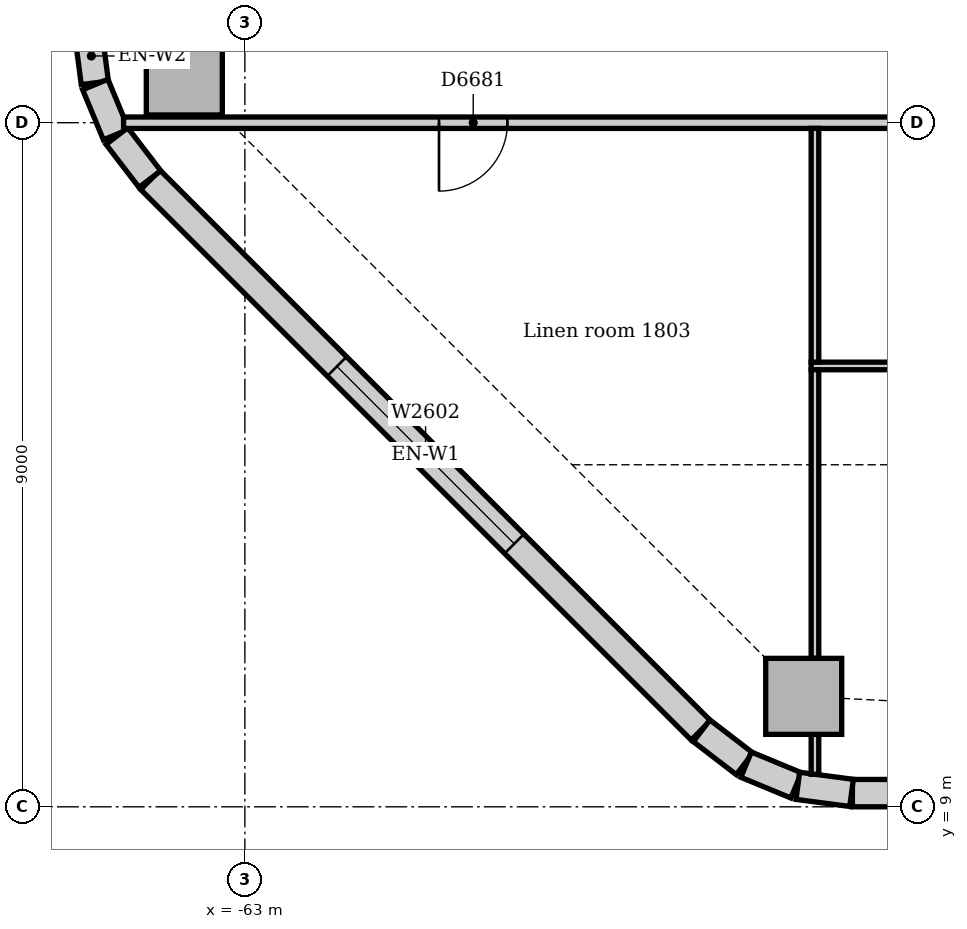
"""IFC4 building model, lengths in metres.
Left out: names, types, materials, properties, quantities, classifications, styles, units other than length and angle.
Written with IfcOpenShell. Run it as: python <this file> out.ifc"""

import sys

from ifc_helpers import new_model, si_unit, direction, frame, frame_2d, origin, origin_2d, place, context, subcontext, project, spatial, rectangle, extrude, element, fill, save


model = new_model("IFC4")
c1 = context("Model", 3, precision=1e-05, world=origin(), true_north=direction((0.0, 1.0)))
c2 = subcontext(c1, "Body", "Model", "MODEL_VIEW")
j1 = project(units=[si_unit("LENGTHUNIT", "METRE"), si_unit("PLANEANGLEUNIT", "RADIAN")], contexts=[c1])
p1 = place(None, origin())
s1 = spatial("IfcSite", under=j1, at=p1, CompositionType="ELEMENT")
p2 = place(p1, origin())
s2 = spatial("IfcBuilding", under=s1, at=p2, CompositionType="ELEMENT")
p3 = place(p2, frame((0.0, 0.0, 79.0)))
s3 = spatial("IfcBuildingStorey", under=s2, at=p3, CompositionType="ELEMENT", Elevation=79.0)
for number, where, z_axis, x_axis in (
    (1, (-55.648, 10.453, 0.0), (0.0, 0.0, 1.0), (1.0, 0.0, 0.0)),
    (2, (-63.797, 18.602, 0.0), (0.0, 0.0, 1.0), (1.0, 0.0, 0.0)),
):
    element("IfcColumn", number, at=place(p3, frame(where, z_axis=z_axis, x_axis=x_axis)), inside=s3, PredefinedType="COLUMN", context=c2, shape_type="SweptSolid", body=[
        extrude(rectangle(XDim=1.0, YDim=1.0, at=origin_2d()), origin(), (0.0, 0.0, 1.0), 3.85),
    ])
p4 = place(p3, frame((-55.007, 9.18, 0.0), z_axis=(0.0, 0.0, 1.0), x_axis=(1.0, 0.0, 0.0)))
e3 = element("IfcWall", 3, at=p4, inside=s3, PredefinedType="STANDARD", context=c2, shape_type="SweptSolid", body=[
    extrude(rectangle(XDim=23.765, YDim=0.36, at=frame_2d((11.882, 0.0))), origin(), (0.0, 0.0, 1.0), 3.85),
])
p5 = place(p4, frame((3.482, 0.0, 0.9)))
e4 = element("IfcOpeningElement", 4, at=p5, cuts=e3, PredefinedType="OPENING", context=c2, shape_type="SweptSolid", body=[
    extrude(rectangle(XDim=3.3, YDim=1.6, at=frame_2d((1.65, 0.8))), frame((0.0, 0.19, 0.0), z_axis=(0.0, -1.0, 0.0), x_axis=(1.0, 0.0, 0.0)), (0.0, 0.0, 1.0), 0.38),
])
p6 = place(p4, frame((7.982, 0.0, 0.9)))
e5 = element("IfcOpeningElement", 5, at=p6, cuts=e3, PredefinedType="OPENING", context=c2, shape_type="SweptSolid", body=[
    extrude(rectangle(XDim=3.3, YDim=1.6, at=frame_2d((1.65, 0.8))), frame((0.0, 0.19, 0.0), z_axis=(0.0, -1.0, 0.0), x_axis=(1.0, 0.0, 0.0)), (0.0, 0.0, 1.0), 0.38),
])
p7 = place(p4, frame((12.482, 0.0, 0.9)))
e6 = element("IfcOpeningElement", 6, at=p7, cuts=e3, PredefinedType="OPENING", context=c2, shape_type="SweptSolid", body=[
    extrude(rectangle(XDim=3.3, YDim=1.6, at=frame_2d((1.65, 0.8))), frame((0.0, 0.19, 0.0), z_axis=(0.0, -1.0, 0.0), x_axis=(1.0, 0.0, 0.0)), (0.0, 0.0, 1.0), 0.38),
])
p8 = place(p4, frame((17.732, 0.0, 0.9)))
e7 = element("IfcOpeningElement", 7, at=p8, cuts=e3, PredefinedType="OPENING", context=c2, shape_type="SweptSolid", body=[
    extrude(rectangle(XDim=3.3, YDim=1.6, at=frame_2d((1.65, 0.8))), frame((0.0, 0.19, 0.0), z_axis=(0.0, -1.0, 0.0), x_axis=(1.0, 0.0, 0.0)), (0.0, 0.0, 1.0), 0.38),
])
p9 = place(p3, frame((-64.244, 17.249, 0.0), z_axis=(0.0, 0.0, 1.0), x_axis=(0.707106781187, -0.707106781187, 0.0)))
e8 = element("IfcWall", 8, at=p9, inside=s3, PredefinedType="STANDARD", context=c2, shape_type="SweptSolid", body=[
    extrude(rectangle(XDim=10.243, YDim=0.36, at=frame_2d((5.121, 0.0))), origin(), (0.0, 0.0, 1.0), 3.85),
])
p10 = place(p9, frame((3.471, 0.0, 0.9)))
e9 = element("IfcOpeningElement", 9, at=p10, cuts=e8, PredefinedType="OPENING", context=c2, shape_type="SweptSolid", body=[
    extrude(rectangle(XDim=3.3, YDim=1.6, at=frame_2d((1.65, 0.8))), frame((0.0, 0.19, 0.0), z_axis=(0.0, -1.0, 0.0), x_axis=(1.0, 0.0, 0.0)), (0.0, 0.0, 1.0), 0.38),
])
for number, where, z_axis, x_axis in (
    (10, (-65.067, 19.231, 0.0), (0.0, 0.0, 1.0), (0.131, -0.991, 0.0)),
    (11, (-64.968, 18.503, 0.0), (0.0, 0.0, 1.0), (0.383, -0.924, 0.0)),
):
    element("IfcWall", number, at=place(p3, frame(where, z_axis=z_axis, x_axis=x_axis)), inside=s3, PredefinedType="STANDARD", context=c2, shape_type="SweptSolid", body=[
        extrude(rectangle(XDim=0.713, YDim=0.36, at=frame_2d((0.356, 0.0))), origin(), (0.0, 0.0, 1.0), 3.85),
    ])
for number, where, z_axis, x_axis in (
    (12, (-64.684, 17.825, 0.0), (0.0, 0.0, 1.0), (0.609, -0.793, 0.0)),
    (13, (-56.991, 10.0, 0.0), (0.0, 0.0, 1.0), (0.793, -0.609, 0.0)),
):
    element("IfcWall", number, at=place(p3, frame(where, z_axis=z_axis, x_axis=x_axis)), inside=s3, PredefinedType="STANDARD", context=c2, shape_type="SweptSolid", body=[
        extrude(rectangle(XDim=0.713, YDim=0.36, at=frame_2d((0.357, 0.0))), origin(), (0.0, 0.0, 1.0), 3.85),
    ])
for number, where, z_axis, x_axis in (
    (14, (-56.406, 9.555, 0.0), (0.0, 0.0, 1.0), (0.924, -0.383, 0.0)),
    (15, (-55.726, 9.276, 0.0), (0.0, 0.0, 1.0), (0.991, -0.131, 0.0)),
):
    element("IfcWall", number, at=place(p3, frame(where, z_axis=z_axis, x_axis=x_axis)), inside=s3, PredefinedType="STANDARD", context=c2, shape_type="SweptSolid", body=[
        extrude(rectangle(XDim=0.713, YDim=0.36, at=frame_2d((0.356, 0.0))), origin(), (0.0, 0.0, 1.0), 3.85),
    ])
p11 = place(p3, frame((-64.596, 18.0, 0.0), z_axis=(0.0, 0.0, 1.0), x_axis=(1.0, 0.0, 0.0)))
e16 = element("IfcWall", 16, at=p11, inside=s3, PredefinedType="PARTITIONING", context=c2, shape_type="SweptSolid", body=[
    extrude(rectangle(XDim=10.246, YDim=0.15, at=frame_2d((5.123, 0.0))), origin(), (0.0, 0.0, 1.0), 3.158),
])
p12 = place(p11, frame((4.15, 0.0, 0.0)))
e17 = element("IfcOpeningElement", 17, at=p12, cuts=e16, PredefinedType="OPENING", context=c2, shape_type="SweptSolid", body=[
    extrude(rectangle(XDim=0.9, YDim=2.1, at=frame_2d((0.45, 1.05))), frame((0.0, 0.085, 0.0), z_axis=(0.0, -1.0, 0.0), x_axis=(1.0, 0.0, 0.0)), (0.0, 0.0, 1.0), 0.17),
])
p13 = place(p3, frame((-55.55, 14.8, 0.0), z_axis=(0.0, 0.0, 1.0), x_axis=(1.0, 0.0, 0.0)))
e18 = element("IfcWall", 18, at=p13, inside=s3, PredefinedType="PARTITIONING", context=c2, shape_type="SweptSolid", body=[
    extrude(rectangle(XDim=17.975, YDim=0.1, at=frame_2d((8.988, 0.0))), origin(), (0.0, 0.0, 1.0), 3.85),
])
p14 = place(p13, frame((7.18, 0.0, 0.0)))
e19 = element("IfcOpeningElement", 19, at=p14, cuts=e18, PredefinedType="OPENING", context=c2, shape_type="SweptSolid", body=[
    extrude(rectangle(XDim=0.9, YDim=2.1, at=frame_2d((0.45, 1.05))), frame((0.0, 0.06, 0.0), z_axis=(0.0, -1.0, 0.0), x_axis=(1.0, 0.0, 0.0)), (0.0, 0.0, 1.0), 0.12),
])
p15 = place(p3, frame((-55.5, 14.85, 0.0), z_axis=(0.0, 0.0, 1.0), x_axis=(0.0, 1.0, 0.0)))
e20 = element("IfcWall", 20, at=p15, inside=s3, PredefinedType="PARTITIONING", context=c2, shape_type="SweptSolid", body=[
    extrude(rectangle(XDim=3.075, YDim=0.1, at=frame_2d((1.538, 0.0))), origin(), (0.0, 0.0, 1.0), 3.85),
])
p16 = place(p3, frame((-55.5, 10.953, 0.0), z_axis=(0.0, 0.0, 1.0), x_axis=(0.0, 1.0, 0.0)))
e21 = element("IfcWall", 21, at=p16, inside=s3, PredefinedType="PARTITIONING", context=c2, shape_type="SweptSolid", body=[
    extrude(rectangle(XDim=3.797, YDim=0.1, at=frame_2d((1.898, 0.0))), origin(), (0.0, 0.0, 1.0), 3.85),
])
p17 = place(p3, frame((-55.5, 9.428, 0.0), z_axis=(0.0, 0.0, 1.0), x_axis=(0.0, 1.0, 0.0)))
e22 = element("IfcWall", 22, at=p17, inside=s3, PredefinedType="PARTITIONING", context=c2, shape_type="SweptSolid", body=[
    extrude(rectangle(XDim=0.525, YDim=0.1, at=frame_2d((0.263, 0.0))), origin(), (0.0, 0.0, 1.0), 3.85),
])
p18 = place(p10, origin())
e23 = element("IfcWindow", 23, at=p18, inside=s3, PartitioningType="SINGLE_PANEL", PredefinedType="WINDOW", context=c2, shape_type="SweptSolid", body=[
    extrude(rectangle(XDim=3.3, YDim=1.6, at=frame_2d((1.65, 0.8))), frame((0.0, 0.13, 0.0), z_axis=(0.0, -1.0, 0.0), x_axis=(1.0, 0.0, 0.0)), (0.0, 0.0, 1.0), 0.06),
])
fill(e9, e23)
p19 = place(p12, frame((0.9, 0.0, 0.0), z_axis=(0.0, 0.0, 1.0), x_axis=(-1.0, 0.0, 0.0)))
e24 = element("IfcDoor", 24, at=p19, inside=s3, OperationType="SINGLE_SWING_RIGHT", PredefinedType="DOOR", context=c2, shape_type="SweptSolid", body=[
    extrude(rectangle(XDim=0.9, YDim=2.1, at=frame_2d((0.45, 1.05))), frame((0.0, 0.025, 0.0), z_axis=(0.0, -1.0, 0.0), x_axis=(1.0, 0.0, 0.0)), (0.0, 0.0, 1.0), 0.05),
])
fill(e17, e24)
save(model, sys.argv[1])
